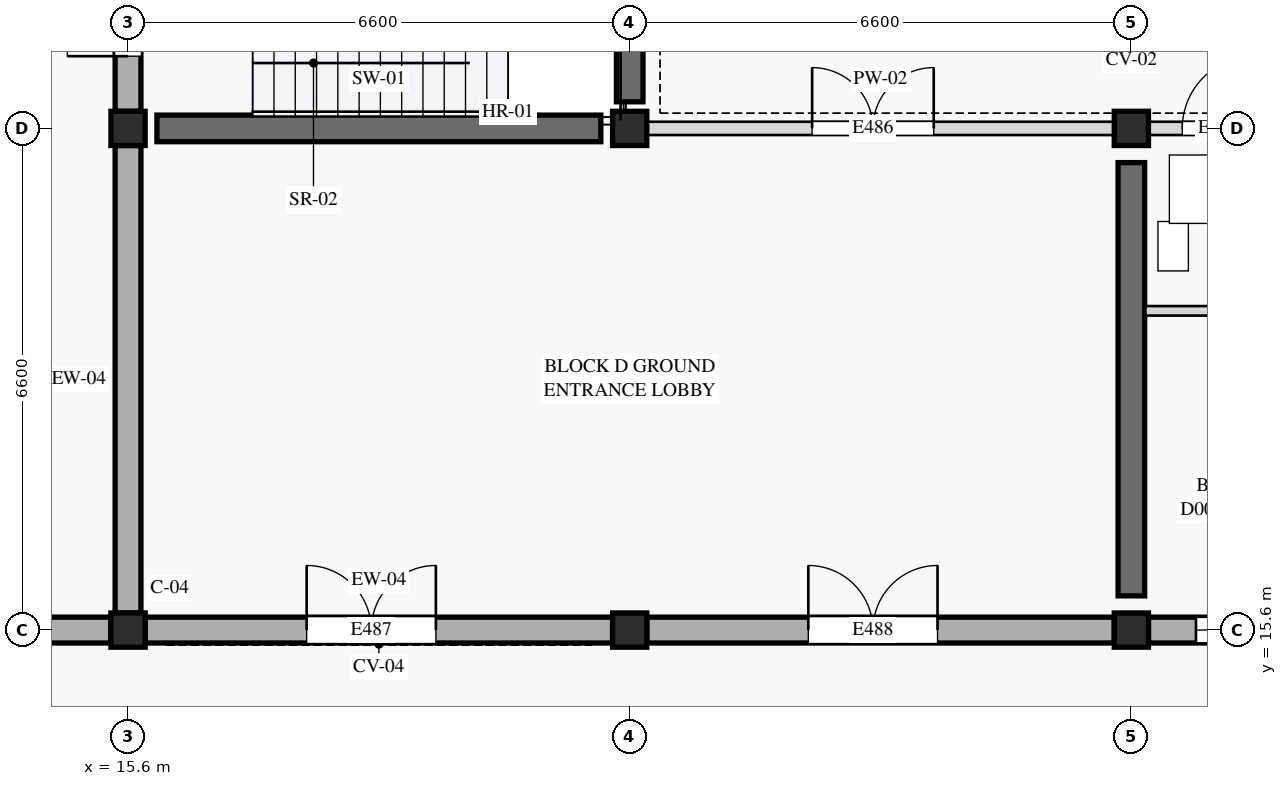
"""IFC4 building model, lengths in metres.
Left out: names, types, materials, properties, quantities, classifications, styles, units other than length and angle.
Written with IfcOpenShell. Run it as: python <this file> out.ifc"""

import sys

from ifc_helpers import new_model, si_unit, direction, frame, frame_2d, origin, origin_2d, place, context, subcontext, project, spatial, rectangle, extrude, element, fill, save


model = new_model("IFC4")
c1 = context("Model", 3, precision=1e-05, world=origin(), true_north=direction((0.0, 1.0)))
c2 = subcontext(c1, "Body", "Model", "MODEL_VIEW")
j1 = project(units=[si_unit("LENGTHUNIT", "METRE"), si_unit("PLANEANGLEUNIT", "RADIAN")], contexts=[c1])
p1 = place(None, origin())
s1 = spatial("IfcSite", under=j1, at=p1, CompositionType="ELEMENT")
p2 = place(p1, origin())
s2 = spatial("IfcBuilding", under=s1, at=p2, CompositionType="ELEMENT")
p3 = place(p2, origin())
s3 = spatial("IfcBuildingStorey", under=s2, at=p3, CompositionType="ELEMENT", Elevation=0.0)
for number, where, z_axis, x_axis in (
    (1, (15.6, 15.6, 0.0), (0.0, 0.0, 1.0), (1.0, 0.0, 0.0)),
    (2, (15.6, 22.2, 0.0), (0.0, 0.0, 1.0), (1.0, 0.0, 0.0)),
    (3, (22.2, 15.6, 0.0), (0.0, 0.0, 1.0), (1.0, 0.0, 0.0)),
    (4, (22.2, 22.2, 0.0), (0.0, 0.0, 1.0), (1.0, 0.0, 0.0)),
    (5, (28.8, 15.6, 0.0), (0.0, 0.0, 1.0), (1.0, 0.0, 0.0)),
    (6, (28.8, 22.2, 0.0), (0.0, 0.0, 1.0), (1.0, 0.0, 0.0)),
):
    element("IfcColumn", number, at=place(p3, frame(where, z_axis=z_axis, x_axis=x_axis)), inside=s3, PredefinedType="COLUMN", context=c2, shape_type="SweptSolid", body=[
        extrude(rectangle(XDim=0.45, YDim=0.45, at=origin_2d()), origin(), (0.0, 0.0, 1.0), 4.2),
    ])
p4 = place(p3, frame((15.98, 22.2, 0.0), z_axis=(0.0, 0.0, 1.0), x_axis=(1.0, 0.0, 0.0)))
e7 = element("IfcWall", 7, at=p4, inside=s3, PredefinedType="SHEAR", context=c2, shape_type="SweptSolid", body=[
    extrude(rectangle(XDim=5.84, YDim=0.35, at=frame_2d((2.92, 0.0))), origin(), (0.0, 0.0, 1.0), 3.92),
])
p5 = place(p3, frame((22.2, 22.55, 0.0), z_axis=(0.0, 0.0, 1.0), x_axis=(0.0, 1.0, 0.0)))
e8 = element("IfcWall", 8, at=p5, inside=s3, PredefinedType="SHEAR", context=c2, shape_type="SweptSolid", body=[
    extrude(rectangle(XDim=2.8, YDim=0.35, at=frame_2d((1.4, 0.0))), origin(), (0.0, 0.0, 1.0), 3.92),
])
p6 = place(p3, frame((28.8, 16.05, 0.0), z_axis=(0.0, 0.0, 1.0), x_axis=(0.0, 1.0, 0.0)))
e9 = element("IfcWall", 9, at=p6, inside=s3, PredefinedType="SHEAR", context=c2, shape_type="SweptSolid", body=[
    extrude(rectangle(XDim=5.7, YDim=0.35, at=frame_2d((2.85, 0.0))), origin(), (0.0, 0.0, 1.0), 3.92),
])
p7 = place(p3, frame((15.825, 15.6, 0.0), z_axis=(0.0, 0.0, 1.0), x_axis=(1.0, 0.0, 0.0)))
e10 = element("IfcWall", 10, at=p7, inside=s3, PredefinedType="STANDARD", context=c2, shape_type="SweptSolid", body=[
    extrude(rectangle(XDim=6.15, YDim=0.34, at=frame_2d((3.075, 0.0))), origin(), (0.0, 0.0, 1.0), 3.6),
])
p8 = place(p7, frame((2.125, 0.0, 0.0)))
e11 = element("IfcOpeningElement", 11, at=p8, cuts=e10, PredefinedType="OPENING", context=c2, shape_type="SweptSolid", body=[
    extrude(rectangle(XDim=1.7, YDim=2.38, at=frame_2d((0.85, 1.19))), frame((0.0, 0.18, 0.0), z_axis=(0.0, -1.0, 0.0), x_axis=(1.0, 0.0, 0.0)), (0.0, 0.0, 1.0), 0.36),
])
p9 = place(p3, frame((22.425, 15.6, 0.0), z_axis=(0.0, 0.0, 1.0), x_axis=(1.0, 0.0, 0.0)))
e12 = element("IfcWall", 12, at=p9, inside=s3, PredefinedType="STANDARD", context=c2, shape_type="SweptSolid", body=[
    extrude(rectangle(XDim=6.15, YDim=0.34, at=frame_2d((3.075, 0.0))), origin(), (0.0, 0.0, 1.0), 3.6),
])
p10 = place(p9, frame((2.125, 0.0, 0.0)))
e13 = element("IfcOpeningElement", 13, at=p10, cuts=e12, PredefinedType="OPENING", context=c2, shape_type="SweptSolid", body=[
    extrude(rectangle(XDim=1.7, YDim=2.38, at=frame_2d((0.85, 1.19))), frame((0.0, 0.18, 0.0), z_axis=(0.0, -1.0, 0.0), x_axis=(1.0, 0.0, 0.0)), (0.0, 0.0, 1.0), 0.36),
])
p11 = place(p3, frame((29.025, 15.6, 0.0), z_axis=(0.0, 0.0, 1.0), x_axis=(1.0, 0.0, 0.0)))
e14 = element("IfcWall", 14, at=p11, inside=s3, PredefinedType="STANDARD", context=c2, shape_type="SweptSolid", body=[
    extrude(rectangle(XDim=6.15, YDim=0.34, at=frame_2d((3.075, 0.0))), origin(), (0.0, 0.0, 1.0), 3.6),
])
p12 = place(p11, frame((0.625, 0.0, 0.85)))
e15 = element("IfcOpeningElement", 15, at=p12, cuts=e14, PredefinedType="OPENING", context=c2, shape_type="SweptSolid", body=[
    extrude(rectangle(XDim=1.8, YDim=1.35, at=frame_2d((0.9, 0.675))), frame((0.0, 0.18, 0.0), z_axis=(0.0, -1.0, 0.0), x_axis=(1.0, 0.0, 0.0)), (0.0, 0.0, 1.0), 0.36),
])
p13 = place(p11, frame((4.025, 0.0, 0.85)))
e16 = element("IfcOpeningElement", 16, at=p13, cuts=e14, PredefinedType="OPENING", context=c2, shape_type="SweptSolid", body=[
    extrude(rectangle(XDim=1.5, YDim=1.35, at=frame_2d((0.75, 0.675))), frame((0.0, 0.18, 0.0), z_axis=(0.0, -1.0, 0.0), x_axis=(1.0, 0.0, 0.0)), (0.0, 0.0, 1.0), 0.36),
])
p14 = place(p3, frame((15.6, 15.825, 0.0), z_axis=(0.0, 0.0, 1.0), x_axis=(0.0, 1.0, 0.0)))
e17 = element("IfcWall", 17, at=p14, inside=s3, PredefinedType="STANDARD", context=c2, shape_type="SweptSolid", body=[
    extrude(rectangle(XDim=6.15, YDim=0.34, at=frame_2d((3.075, 0.0))), origin(), (0.0, 0.0, 1.0), 3.65),
])
p15 = place(p3, frame((8.025, 15.6, 0.0), z_axis=(0.0, 0.0, 1.0), x_axis=(1.0, 0.0, 0.0)))
e18 = element("IfcWall", 18, at=p15, inside=s3, PredefinedType="STANDARD", context=c2, shape_type="SweptSolid", body=[
    extrude(rectangle(XDim=7.35, YDim=0.34, at=frame_2d((3.675, 0.0))), origin(), (0.0, 0.0, 1.0), 3.5),
])
p16 = place(p3, frame((15.6, 22.425, 0.0), z_axis=(0.0, 0.0, 1.0), x_axis=(0.0, 1.0, 0.0)))
e19 = element("IfcWall", 19, at=p16, inside=s3, PredefinedType="STANDARD", context=c2, shape_type="SweptSolid", body=[
    extrude(rectangle(XDim=3.185, YDim=0.34, at=frame_2d((1.593, 0.0))), origin(), (0.0, 0.0, 1.0), 3.65),
])
p17 = place(p16, frame((0.725, 0.0, 0.0)))
e20 = element("IfcOpeningElement", 20, at=p17, cuts=e19, PredefinedType="OPENING", context=c2, shape_type="SweptSolid", body=[
    extrude(rectangle(XDim=1.6, YDim=2.4, at=frame_2d((0.8, 1.2))), frame((0.0, 0.18, 0.0), z_axis=(0.0, -1.0, 0.0), x_axis=(1.0, 0.0, 0.0)), (0.0, 0.0, 1.0), 0.36),
])
p18 = place(p3, frame((22.2, 22.2, 0.0), z_axis=(0.0, 0.0, 1.0), x_axis=(1.0, 0.0, 0.0)))
e21 = element("IfcWall", 21, at=p18, inside=s3, PredefinedType="PARTITIONING", context=c2, shape_type="SweptSolid", body=[
    extrude(rectangle(XDim=6.6, YDim=0.175, at=frame_2d((3.3, 0.0))), origin(), (0.0, 0.0, 1.0), 3.55),
])
p19 = place(p18, frame((2.4, 0.0, 0.0)))
e22 = element("IfcOpeningElement", 22, at=p19, cuts=e21, PredefinedType="OPENING", context=c2, shape_type="SweptSolid", body=[
    extrude(rectangle(XDim=1.6, YDim=2.2, at=frame_2d((0.8, 1.1))), frame((0.0, 0.097, 0.0), z_axis=(0.0, -1.0, 0.0), x_axis=(1.0, 0.0, 0.0)), (0.0, 0.0, 1.0), 0.195),
])
p20 = place(p3, frame((28.8, 22.2, 0.0), z_axis=(0.0, 0.0, 1.0), x_axis=(1.0, 0.0, 0.0)))
e23 = element("IfcWall", 23, at=p20, inside=s3, PredefinedType="PARTITIONING", context=c2, shape_type="SweptSolid", body=[
    extrude(rectangle(XDim=13.2, YDim=0.175, at=frame_2d((6.6, 0.0))), origin(), (0.0, 0.0, 1.0), 3.55),
])
p21 = place(p20, frame((0.67, 0.0, 0.0)))
e24 = element("IfcOpeningElement", 24, at=p21, cuts=e23, PredefinedType="OPENING", context=c2, shape_type="SweptSolid", body=[
    extrude(rectangle(XDim=0.95, YDim=2.1, at=frame_2d((0.475, 1.05))), frame((0.0, 0.097, 0.0), z_axis=(0.0, -1.0, 0.0), x_axis=(1.0, 0.0, 0.0)), (0.0, 0.0, 1.0), 0.195),
])
p22 = place(p3, frame((28.985, 19.8, 0.0), z_axis=(0.0, 0.0, 1.0), x_axis=(1.0, 0.0, 0.0)))
e25 = element("IfcWall", 25, at=p22, inside=s3, PredefinedType="PARTITIONING", context=c2, shape_type="SweptSolid", body=[
    extrude(rectangle(XDim=1.635, YDim=0.125, at=frame_2d((0.817, 0.0))), origin(), (0.0, 0.0, 1.0), 3.92),
])
p23 = place(p12, origin())
e26 = element("IfcWindow", 26, at=p23, inside=s3, PartitioningType="SINGLE_PANEL", PredefinedType="WINDOW", context=c2, shape_type="SweptSolid", body=[
    extrude(rectangle(XDim=1.8, YDim=1.35, at=frame_2d((0.9, 0.675))), frame((0.0, 0.03, 0.0), z_axis=(0.0, -1.0, 0.0), x_axis=(1.0, 0.0, 0.0)), (0.0, 0.0, 1.0), 0.06),
])
fill(e15, e26)
p24 = place(p8, origin())
e27 = element("IfcDoor", 27, at=p24, inside=s3, OperationType="DOUBLE_DOOR_SINGLE_SWING", PredefinedType="DOOR", context=c2, shape_type="SweptSolid", body=[
    extrude(rectangle(XDim=1.7, YDim=2.38, at=frame_2d((0.85, 1.19))), frame((0.0, 0.025, 0.0), z_axis=(0.0, -1.0, 0.0), x_axis=(1.0, 0.0, 0.0)), (0.0, 0.0, 1.0), 0.05),
])
fill(e11, e27)
p25 = place(p10, origin())
e28 = element("IfcDoor", 28, at=p25, inside=s3, OperationType="DOUBLE_DOOR_SINGLE_SWING", PredefinedType="DOOR", context=c2, shape_type="SweptSolid", body=[
    extrude(rectangle(XDim=1.7, YDim=2.38, at=frame_2d((0.85, 1.19))), frame((0.0, 0.025, 0.0), z_axis=(0.0, -1.0, 0.0), x_axis=(1.0, 0.0, 0.0)), (0.0, 0.0, 1.0), 0.05),
])
fill(e13, e28)
p26 = place(p17, origin())
e29 = element("IfcDoor", 29, at=p26, inside=s3, OperationType="DOUBLE_DOOR_SINGLE_SWING", PredefinedType="DOOR", context=c2, shape_type="SweptSolid", body=[
    extrude(rectangle(XDim=1.6, YDim=2.4, at=frame_2d((0.8, 1.2))), frame((0.0, 0.025, 0.0), z_axis=(0.0, -1.0, 0.0), x_axis=(1.0, 0.0, 0.0)), (0.0, 0.0, 1.0), 0.05),
])
fill(e20, e29)
p27 = place(p19, origin())
e30 = element("IfcDoor", 30, at=p27, inside=s3, OperationType="DOUBLE_DOOR_SINGLE_SWING", PredefinedType="DOOR", context=c2, shape_type="SweptSolid", body=[
    extrude(rectangle(XDim=1.6, YDim=2.2, at=frame_2d((0.8, 1.1))), frame((0.0, 0.025, 0.0), z_axis=(0.0, -1.0, 0.0), x_axis=(1.0, 0.0, 0.0)), (0.0, 0.0, 1.0), 0.05),
])
fill(e22, e30)
p28 = place(p21, origin())
e31 = element("IfcDoor", 31, at=p28, inside=s3, OperationType="SINGLE_SWING_RIGHT", PredefinedType="DOOR", context=c2, shape_type="SweptSolid", body=[
    extrude(rectangle(XDim=0.95, YDim=2.1, at=frame_2d((0.475, 1.05))), frame((0.0, 0.025, 0.0), z_axis=(0.0, -1.0, 0.0), x_axis=(1.0, 0.0, 0.0)), (0.0, 0.0, 1.0), 0.05),
])
fill(e24, e31)
save(model, sys.argv[1])
